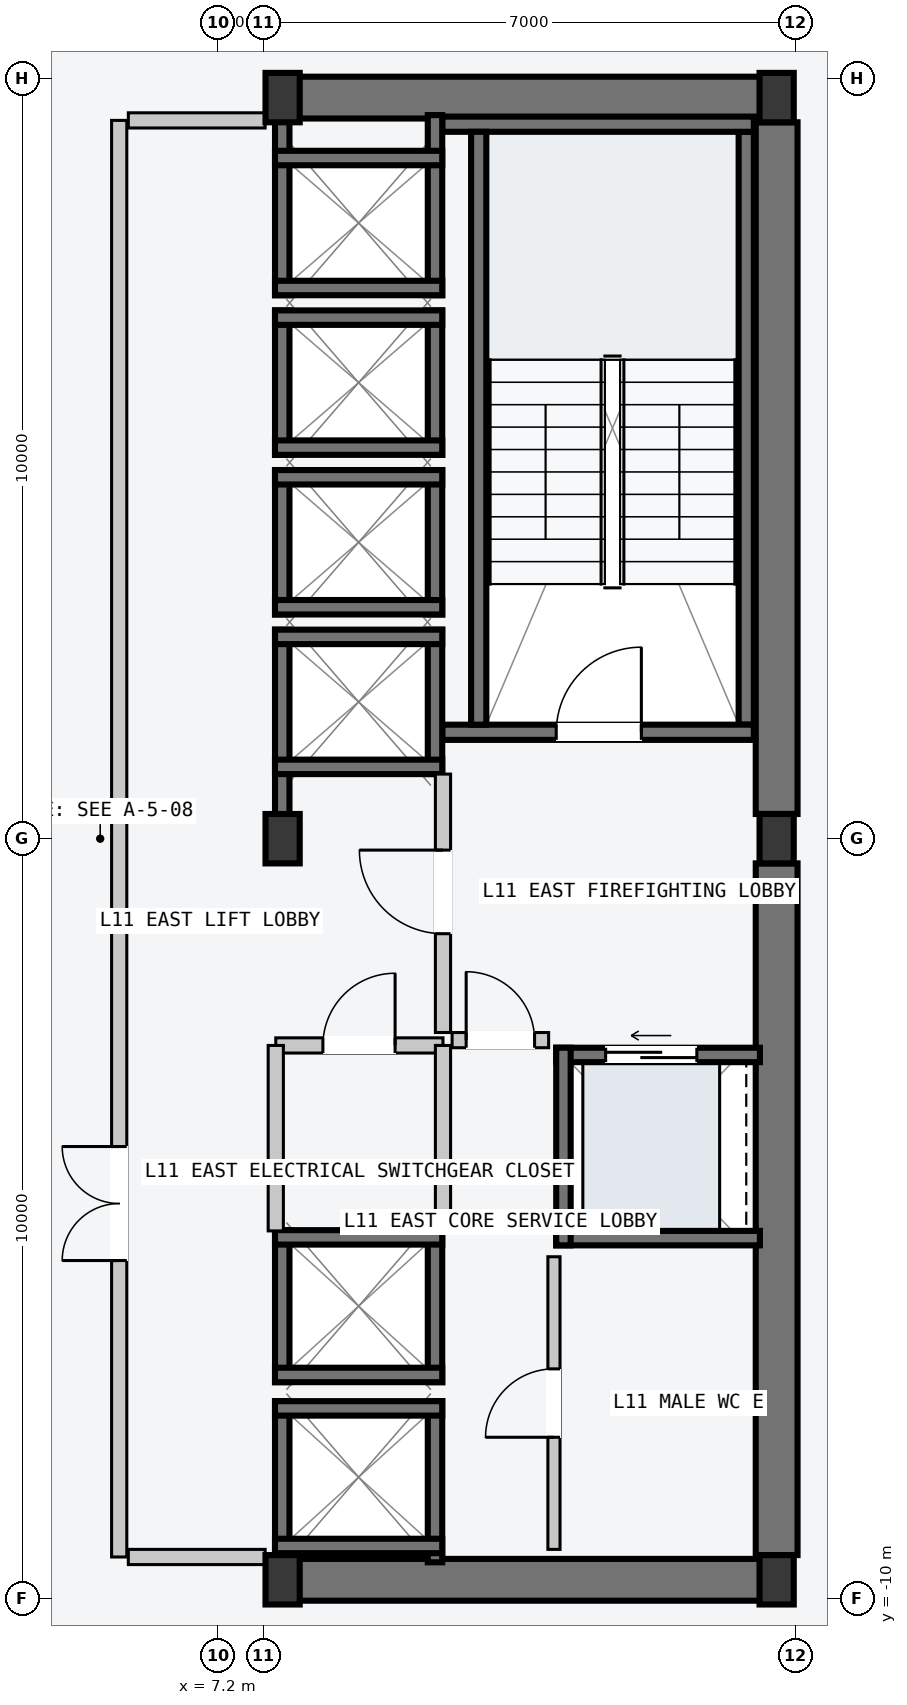
"""IFC4 building model, lengths in metres.
Left out: names, types, materials, properties, quantities, classifications, styles, units other than length and angle.
Written with IfcOpenShell. Run it as: python <this file> out.ifc"""

import sys

from ifc_helpers import new_model, si_unit, direction, frame, frame_2d, origin, origin_2d, place, context, subcontext, project, spatial, rectangle, i_section, extrude, element, fill, save


model = new_model("IFC4")
c1 = context("Model", 3, precision=1e-05, world=origin(), true_north=direction((0.0, 1.0)))
c2 = subcontext(c1, "Body", "Model", "MODEL_VIEW")
j1 = project(units=[si_unit("LENGTHUNIT", "METRE"), si_unit("PLANEANGLEUNIT", "RADIAN")], contexts=[c1])
p1 = place(None, origin())
s1 = spatial("IfcSite", under=j1, at=p1, CompositionType="ELEMENT")
p2 = place(p1, origin())
s2 = spatial("IfcBuilding", under=s1, at=p2, CompositionType="ELEMENT")
p3 = place(p2, frame((0.0, 0.0, 45.6)))
s3 = spatial("IfcBuildingStorey", under=s2, at=p3, CompositionType="ELEMENT", Elevation=45.6)
for number, where, z_axis, x_axis in (
    (1, (8.07, -9.75, -0.2), (0.0, 0.0, 1.0), (1.0, 0.0, 0.0)),
    (2, (8.07, 9.75, -0.2), (0.0, 0.0, 1.0), (1.0, 0.0, 0.0)),
):
    element("IfcWall", number, at=place(p3, frame(where, z_axis=z_axis, x_axis=x_axis)), inside=s3, PredefinedType="SHEAR", context=c2, shape_type="SweptSolid", body=[
        extrude(rectangle(XDim=6.46, YDim=0.55, at=frame_2d((3.23, 0.0))), origin(), (0.0, 0.0, 1.0), 3.6),
    ])
for number, where, z_axis, x_axis in (
    (3, (14.55, -9.425, -0.2), (0.0, 0.0, 1.0), (0.0, 1.0, 0.0)),
    (4, (14.55, 0.325, -0.2), (0.0, 0.0, 1.0), (0.0, 1.0, 0.0)),
):
    element("IfcWall", number, at=place(p3, frame(where, z_axis=z_axis, x_axis=x_axis)), inside=s3, PredefinedType="SHEAR", context=c2, shape_type="SweptSolid", body=[
        extrude(rectangle(XDim=9.1, YDim=0.55, at=frame_2d((4.55, 0.0))), origin(), (0.0, 0.0, 1.0), 3.6),
    ])
p4 = place(p3, frame((14.15, 1.5, -0.2), z_axis=(0.0, 0.0, 1.0), x_axis=(0.0, 1.0, 0.0)))
e5 = element("IfcWall", 5, at=p4, inside=s3, PredefinedType="SOLIDWALL", context=c2, shape_type="SweptSolid", body=[
    extrude(rectangle(XDim=7.8, YDim=0.2, at=frame_2d((3.9, 0.0))), origin(), (0.0, 0.0, 1.0), 3.6),
])
p5 = place(p3, frame((10.15, 1.4, -0.2), z_axis=(0.0, 0.0, 1.0), x_axis=(1.0, 0.0, 0.0)))
e6 = element("IfcWall", 6, at=p5, inside=s3, PredefinedType="SOLIDWALL", context=c2, shape_type="SweptSolid", body=[
    extrude(rectangle(XDim=4.1, YDim=0.2, at=frame_2d((2.05, 0.0))), origin(), (0.0, 0.0, 1.0), 3.6),
])
p6 = place(p5, frame((1.5, 0.0, 0.2)))
e7 = element("IfcOpeningElement", 7, at=p6, cuts=e6, PredefinedType="OPENING", context=c2, shape_type="SweptSolid", body=[
    extrude(rectangle(XDim=1.12, YDim=2.18, at=frame_2d((0.56, 1.09))), frame((0.0, 0.11, 0.0), z_axis=(0.0, -1.0, 0.0), x_axis=(1.0, 0.0, 0.0)), (0.0, 0.0, 1.0), 0.22),
])
p7 = place(p3, frame((10.15, 9.4, -0.2), z_axis=(0.0, 0.0, 1.0), x_axis=(1.0, 0.0, 0.0)))
e8 = element("IfcWall", 8, at=p7, inside=s3, PredefinedType="SOLIDWALL", context=c2, shape_type="SweptSolid", body=[
    extrude(rectangle(XDim=4.1, YDim=0.2, at=frame_2d((2.05, 0.0))), origin(), (0.0, 0.0, 1.0), 3.6),
])
p8 = place(p3, frame((10.63, 1.5, -0.2), z_axis=(0.0, 0.0, 1.0), x_axis=(0.0, 1.0, 0.0)))
e9 = element("IfcWall", 9, at=p8, inside=s3, PredefinedType="SOLIDWALL", context=c2, shape_type="SweptSolid", body=[
    extrude(rectangle(XDim=7.8, YDim=0.2, at=frame_2d((3.9, 0.0))), origin(), (0.0, 0.0, 1.0), 3.6),
])
for number, where, z_axis, x_axis in (
    (10, (8.05, -9.75, 0.0), (0.0, 0.0, 1.0), (1.0, 0.0, 0.0)),
    (11, (8.05, 0.0, 0.0), (0.0, 0.0, 1.0), (1.0, 0.0, 0.0)),
    (12, (8.05, 9.75, 0.0), (0.0, 0.0, 1.0), (1.0, 0.0, 0.0)),
    (13, (14.55, -9.75, 0.0), (0.0, 0.0, 1.0), (1.0, 0.0, 0.0)),
    (14, (14.55, 0.0, 0.0), (0.0, 0.0, 1.0), (1.0, 0.0, 0.0)),
    (15, (14.55, 9.75, 0.0), (0.0, 0.0, 1.0), (1.0, 0.0, 0.0)),
):
    element("IfcColumn", number, at=place(p3, frame(where, z_axis=z_axis, x_axis=x_axis)), inside=s3, PredefinedType="COLUMN", context=c2, shape_type="SweptSolid", body=[
        extrude(i_section(OverallWidth=0.45, OverallDepth=0.65, WebThickness=0.025, FlangeThickness=0.04, at=origin_2d()), origin(), (0.0, 0.0, 1.0), 3.6),
    ])
p9 = place(p3, frame((8.045, 0.21, -0.2), z_axis=(0.0, 0.0, 1.0), x_axis=(0.0, 1.0, 0.0)))
e16 = element("IfcWall", 16, at=p9, inside=s3, PredefinedType="SOLIDWALL", context=c2, shape_type="SweptSolid", body=[
    extrude(rectangle(XDim=2.54, YDim=0.19, at=frame_2d((1.27, 0.0))), origin(), (0.0, 0.0, 1.0), 3.6),
])
p10 = place(p3, frame((10.055, 0.85, -0.2), z_axis=(0.0, 0.0, 1.0), x_axis=(0.0, 1.0, 0.0)))
e17 = element("IfcWall", 17, at=p10, inside=s3, PredefinedType="SOLIDWALL", context=c2, shape_type="SweptSolid", body=[
    extrude(rectangle(XDim=1.9, YDim=0.19, at=frame_2d((0.95, 0.0))), origin(), (0.0, 0.0, 1.0), 3.6),
])
for number, where, z_axis, x_axis in (
    (18, (7.95, 2.655, -0.2), (0.0, 0.0, 1.0), (1.0, 0.0, 0.0)),
    (19, (7.95, 0.945, -0.2), (0.0, 0.0, 1.0), (1.0, 0.0, 0.0)),
):
    element("IfcWall", number, at=place(p3, frame(where, z_axis=z_axis, x_axis=x_axis)), inside=s3, PredefinedType="SOLIDWALL", context=c2, shape_type="SweptSolid", body=[
        extrude(rectangle(XDim=2.2, YDim=0.19, at=frame_2d((1.1, 0.0))), origin(), (0.0, 0.0, 1.0), 3.6),
    ])
for number, where, z_axis, x_axis in (
    (20, (8.045, 2.95, -0.2), (0.0, 0.0, 1.0), (0.0, 1.0, 0.0)),
    (21, (10.055, 2.95, -0.2), (0.0, 0.0, 1.0), (0.0, 1.0, 0.0)),
):
    element("IfcWall", number, at=place(p3, frame(where, z_axis=z_axis, x_axis=x_axis)), inside=s3, PredefinedType="SOLIDWALL", context=c2, shape_type="SweptSolid", body=[
        extrude(rectangle(XDim=1.9, YDim=0.19, at=frame_2d((0.95, 0.0))), origin(), (0.0, 0.0, 1.0), 3.6),
    ])
for number, where, z_axis, x_axis in (
    (22, (7.95, 4.755, -0.2), (0.0, 0.0, 1.0), (1.0, 0.0, 0.0)),
    (23, (7.95, 3.045, -0.2), (0.0, 0.0, 1.0), (1.0, 0.0, 0.0)),
):
    element("IfcWall", number, at=place(p3, frame(where, z_axis=z_axis, x_axis=x_axis)), inside=s3, PredefinedType="SOLIDWALL", context=c2, shape_type="SweptSolid", body=[
        extrude(rectangle(XDim=2.2, YDim=0.19, at=frame_2d((1.1, 0.0))), origin(), (0.0, 0.0, 1.0), 3.6),
    ])
for number, where, z_axis, x_axis in (
    (24, (8.045, 5.05, -0.2), (0.0, 0.0, 1.0), (0.0, 1.0, 0.0)),
    (25, (10.055, 5.05, -0.2), (0.0, 0.0, 1.0), (0.0, 1.0, 0.0)),
):
    element("IfcWall", number, at=place(p3, frame(where, z_axis=z_axis, x_axis=x_axis)), inside=s3, PredefinedType="SOLIDWALL", context=c2, shape_type="SweptSolid", body=[
        extrude(rectangle(XDim=1.9, YDim=0.19, at=frame_2d((0.95, 0.0))), origin(), (0.0, 0.0, 1.0), 3.6),
    ])
for number, where, z_axis, x_axis in (
    (26, (7.95, 6.855, -0.2), (0.0, 0.0, 1.0), (1.0, 0.0, 0.0)),
    (27, (7.95, 5.145, -0.2), (0.0, 0.0, 1.0), (1.0, 0.0, 0.0)),
):
    element("IfcWall", number, at=place(p3, frame(where, z_axis=z_axis, x_axis=x_axis)), inside=s3, PredefinedType="SOLIDWALL", context=c2, shape_type="SweptSolid", body=[
        extrude(rectangle(XDim=2.2, YDim=0.19, at=frame_2d((1.1, 0.0))), origin(), (0.0, 0.0, 1.0), 3.6),
    ])
for number, where, z_axis, x_axis in (
    (28, (8.045, 7.15, -0.2), (0.0, 0.0, 1.0), (0.0, 1.0, 0.0)),
    (29, (10.055, 7.15, -0.2), (0.0, 0.0, 1.0), (0.0, 1.0, 0.0)),
):
    element("IfcWall", number, at=place(p3, frame(where, z_axis=z_axis, x_axis=x_axis)), inside=s3, PredefinedType="SOLIDWALL", context=c2, shape_type="SweptSolid", body=[
        extrude(rectangle(XDim=2.37, YDim=0.19, at=frame_2d((1.185, 0.0))), origin(), (0.0, 0.0, 1.0), 3.6),
    ])
for number, where, z_axis, x_axis in (
    (30, (7.95, 8.955, -0.2), (0.0, 0.0, 1.0), (1.0, 0.0, 0.0)),
    (31, (7.95, 7.245, -0.2), (0.0, 0.0, 1.0), (1.0, 0.0, 0.0)),
):
    element("IfcWall", number, at=place(p3, frame(where, z_axis=z_axis, x_axis=x_axis)), inside=s3, PredefinedType="SOLIDWALL", context=c2, shape_type="SweptSolid", body=[
        extrude(rectangle(XDim=2.2, YDim=0.19, at=frame_2d((1.1, 0.0))), origin(), (0.0, 0.0, 1.0), 3.6),
    ])
for number, where, z_axis, x_axis in (
    (32, (8.045, -9.52, -0.2), (0.0, 0.0, 1.0), (0.0, 1.0, 0.0)),
    (33, (10.055, -9.52, -0.2), (0.0, 0.0, 1.0), (0.0, 1.0, 0.0)),
):
    element("IfcWall", number, at=place(p3, frame(where, z_axis=z_axis, x_axis=x_axis)), inside=s3, PredefinedType="SOLIDWALL", context=c2, shape_type="SweptSolid", body=[
        extrude(rectangle(XDim=2.12, YDim=0.19, at=frame_2d((1.06, 0.0))), origin(), (0.0, 0.0, 1.0), 3.6),
    ])
for number, where, z_axis, x_axis in (
    (34, (7.95, -7.495, -0.2), (0.0, 0.0, 1.0), (1.0, 0.0, 0.0)),
    (35, (7.95, -9.305, -0.2), (0.0, 0.0, 1.0), (1.0, 0.0, 0.0)),
):
    element("IfcWall", number, at=place(p3, frame(where, z_axis=z_axis, x_axis=x_axis)), inside=s3, PredefinedType="SOLIDWALL", context=c2, shape_type="SweptSolid", body=[
        extrude(rectangle(XDim=2.2, YDim=0.19, at=frame_2d((1.1, 0.0))), origin(), (0.0, 0.0, 1.0), 3.6),
    ])
for number, where, z_axis, x_axis in (
    (36, (8.045, -7.15, -0.2), (0.0, 0.0, 1.0), (0.0, 1.0, 0.0)),
    (37, (10.055, -7.15, -0.2), (0.0, 0.0, 1.0), (0.0, 1.0, 0.0)),
):
    element("IfcWall", number, at=place(p3, frame(where, z_axis=z_axis, x_axis=x_axis)), inside=s3, PredefinedType="SOLIDWALL", context=c2, shape_type="SweptSolid", body=[
        extrude(rectangle(XDim=2.0, YDim=0.19, at=frame_2d((1.0, 0.0))), origin(), (0.0, 0.0, 1.0), 3.6),
    ])
for number, where, z_axis, x_axis in (
    (38, (7.95, -5.245, -0.2), (0.0, 0.0, 1.0), (1.0, 0.0, 0.0)),
    (39, (7.95, -7.055, -0.2), (0.0, 0.0, 1.0), (1.0, 0.0, 0.0)),
):
    element("IfcWall", number, at=place(p3, frame(where, z_axis=z_axis, x_axis=x_axis)), inside=s3, PredefinedType="SOLIDWALL", context=c2, shape_type="SweptSolid", body=[
        extrude(rectangle(XDim=2.2, YDim=0.19, at=frame_2d((1.1, 0.0))), origin(), (0.0, 0.0, 1.0), 3.6),
    ])
p11 = place(p3, frame((11.65, -2.845, -0.2), z_axis=(0.0, 0.0, 1.0), x_axis=(1.0, 0.0, 0.0)))
e40 = element("IfcWall", 40, at=p11, inside=s3, PredefinedType="SOLIDWALL", context=c2, shape_type="SweptSolid", body=[
    extrude(rectangle(XDim=2.68, YDim=0.19, at=frame_2d((1.34, 0.0))), origin(), (0.0, 0.0, 1.0), 3.6),
])
p12 = place(p11, frame((0.65, 0.0, 0.2)))
e41 = element("IfcOpeningElement", 41, at=p12, cuts=e40, PredefinedType="OPENING", context=c2, shape_type="SweptSolid", body=[
    extrude(rectangle(XDim=1.2, YDim=2.2, at=frame_2d((0.6, 1.1))), frame((0.0, 0.105, 0.0), z_axis=(0.0, -1.0, 0.0), x_axis=(1.0, 0.0, 0.0)), (0.0, 0.0, 1.0), 0.21),
])
p13 = place(p3, frame((11.65, -5.255, -0.2), z_axis=(0.0, 0.0, 1.0), x_axis=(1.0, 0.0, 0.0)))
e42 = element("IfcWall", 42, at=p13, inside=s3, PredefinedType="SOLIDWALL", context=c2, shape_type="SweptSolid", body=[
    extrude(rectangle(XDim=2.68, YDim=0.19, at=frame_2d((1.34, 0.0))), origin(), (0.0, 0.0, 1.0), 3.6),
])
p14 = place(p3, frame((11.745, -5.35, -0.2), z_axis=(0.0, 0.0, 1.0), x_axis=(0.0, 1.0, 0.0)))
e43 = element("IfcWall", 43, at=p14, inside=s3, PredefinedType="SOLIDWALL", context=c2, shape_type="SweptSolid", body=[
    extrude(rectangle(XDim=2.6, YDim=0.19, at=frame_2d((1.3, 0.0))), origin(), (0.0, 0.0, 1.0), 3.6),
])
p15 = place(p3, frame((5.9, -9.45, 0.0), z_axis=(0.0, 0.0, 1.0), x_axis=(0.0, 1.0, 0.0)))
e44 = element("IfcWall", 44, at=p15, inside=s3, PredefinedType="PARTITIONING", context=c2, shape_type="SweptSolid", body=[
    extrude(rectangle(XDim=18.9, YDim=0.2, at=frame_2d((9.45, 0.0))), origin(), (0.0, 0.0, 1.0), 3.4),
])
p16 = place(p15, frame((3.9, 0.0, 0.0)))
e45 = element("IfcOpeningElement", 45, at=p16, cuts=e44, PredefinedType="OPENING", context=c2, shape_type="SweptSolid", body=[
    extrude(rectangle(XDim=1.5, YDim=2.2, at=frame_2d((0.75, 1.1))), frame((0.0, 0.11, 0.0), z_axis=(0.0, -1.0, 0.0), x_axis=(1.0, 0.0, 0.0)), (0.0, 0.0, 1.0), 0.22),
])
for number, where, z_axis, x_axis in (
    (46, (6.02, -9.45, 0.0), (0.0, 0.0, 1.0), (1.0, 0.0, 0.0)),
    (47, (6.02, 9.45, 0.0), (0.0, 0.0, 1.0), (1.0, 0.0, 0.0)),
):
    element("IfcWall", number, at=place(p3, frame(where, z_axis=z_axis, x_axis=x_axis)), inside=s3, PredefinedType="PARTITIONING", context=c2, shape_type="SweptSolid", body=[
        extrude(rectangle(XDim=1.8, YDim=0.2, at=frame_2d((0.9, 0.0))), origin(), (0.0, 0.0, 1.0), 3.4),
    ])
p17 = place(p3, frame((10.16, -2.55, 0.0), z_axis=(0.0, 0.0, 1.0), x_axis=(0.0, 1.0, 0.0)))
e48 = element("IfcWall", 48, at=p17, inside=s3, PredefinedType="PARTITIONING", context=c2, shape_type="SweptSolid", body=[
    extrude(rectangle(XDim=3.4, YDim=0.2, at=frame_2d((1.7, 0.0))), origin(), (0.0, 0.0, 1.0), 3.4),
])
p18 = place(p17, frame((1.3, 0.0, 0.0)))
e49 = element("IfcOpeningElement", 49, at=p18, cuts=e48, PredefinedType="OPENING", context=c2, shape_type="SweptSolid", body=[
    extrude(rectangle(XDim=1.1, YDim=2.15, at=frame_2d((0.55, 1.075))), frame((0.0, 0.11, 0.0), z_axis=(0.0, -1.0, 0.0), x_axis=(1.0, 0.0, 0.0)), (0.0, 0.0, 1.0), 0.22),
])
p19 = place(p3, frame((10.28, -2.65, 0.0), z_axis=(0.0, 0.0, 1.0), x_axis=(1.0, 0.0, 0.0)))
e50 = element("IfcWall", 50, at=p19, inside=s3, PredefinedType="PARTITIONING", context=c2, shape_type="SweptSolid", body=[
    extrude(rectangle(XDim=1.27, YDim=0.2, at=frame_2d((0.635, 0.0))), origin(), (0.0, 0.0, 1.0), 3.4),
])
p20 = place(p19, frame((0.185, 0.0, 0.0)))
e51 = element("IfcOpeningElement", 51, at=p20, cuts=e50, PredefinedType="OPENING", context=c2, shape_type="SweptSolid", body=[
    extrude(rectangle(XDim=0.9, YDim=2.15, at=frame_2d((0.45, 1.075))), frame((0.0, 0.11, 0.0), z_axis=(0.0, -1.0, 0.0), x_axis=(1.0, 0.0, 0.0)), (0.0, 0.0, 1.0), 0.22),
])
p21 = place(p3, frame((7.96, -2.72, 0.0), z_axis=(0.0, 0.0, 1.0), x_axis=(1.0, 0.0, 0.0)))
e52 = element("IfcWall", 52, at=p21, inside=s3, PredefinedType="PARTITIONING", context=c2, shape_type="SweptSolid", body=[
    extrude(rectangle(XDim=2.2, YDim=0.2, at=frame_2d((1.1, 0.0))), origin(), (0.0, 0.0, 1.0), 3.4),
])
p22 = place(p21, frame((0.62, 0.0, 0.0)))
e53 = element("IfcOpeningElement", 53, at=p22, cuts=e52, PredefinedType="OPENING", context=c2, shape_type="SweptSolid", body=[
    extrude(rectangle(XDim=0.95, YDim=2.1, at=frame_2d((0.475, 1.05))), frame((0.0, 0.11, 0.0), z_axis=(0.0, -1.0, 0.0), x_axis=(1.0, 0.0, 0.0)), (0.0, 0.0, 1.0), 0.22),
])
for number, where, z_axis, x_axis in (
    (54, (7.96, -5.16, 0.0), (0.0, 0.0, 1.0), (0.0, 1.0, 0.0)),
    (55, (10.16, -5.16, 0.0), (0.0, 0.0, 1.0), (0.0, 1.0, 0.0)),
):
    element("IfcWall", number, at=place(p3, frame(where, z_axis=z_axis, x_axis=x_axis)), inside=s3, PredefinedType="PARTITIONING", context=c2, shape_type="SweptSolid", body=[
        extrude(rectangle(XDim=2.44, YDim=0.2, at=frame_2d((1.22, 0.0))), origin(), (0.0, 0.0, 1.0), 3.4),
    ])
p23 = place(p3, frame((11.62, -9.35, 0.0), z_axis=(0.0, 0.0, 1.0), x_axis=(0.0, 1.0, 0.0)))
e56 = element("IfcWall", 56, at=p23, inside=s3, PredefinedType="PARTITIONING", context=c2, shape_type="SweptSolid", body=[
    extrude(rectangle(XDim=3.85, YDim=0.16, at=frame_2d((1.925, 0.0))), origin(), (0.0, 0.0, 1.0), 3.4),
])
p24 = place(p23, frame((1.475, 0.0, 0.0)))
e57 = element("IfcOpeningElement", 57, at=p24, cuts=e56, PredefinedType="OPENING", context=c2, shape_type="SweptSolid", body=[
    extrude(rectangle(XDim=0.9, YDim=2.15, at=frame_2d((0.45, 1.075))), frame((0.0, 0.09, 0.0), z_axis=(0.0, -1.0, 0.0), x_axis=(1.0, 0.0, 0.0)), (0.0, 0.0, 1.0), 0.18),
])
p25 = place(p6, origin())
e58 = element("IfcDoor", 58, at=p25, inside=s3, OperationType="SINGLE_SWING_RIGHT", PredefinedType="DOOR", context=c2, shape_type="SweptSolid", body=[
    extrude(rectangle(XDim=1.12, YDim=2.18, at=frame_2d((0.56, 1.09))), frame((0.0, 0.025, 0.0), z_axis=(0.0, -1.0, 0.0), x_axis=(1.0, 0.0, 0.0)), (0.0, 0.0, 1.0), 0.05),
])
fill(e7, e58)
p26 = place(p12, origin())
e59 = element("IfcDoor", 59, at=p26, inside=s3, OperationType="SLIDING_TO_LEFT", PredefinedType="DOOR", context=c2, shape_type="SweptSolid", body=[
    extrude(rectangle(XDim=1.2, YDim=2.2, at=frame_2d((0.6, 1.1))), frame((0.0, 0.025, 0.0), z_axis=(0.0, -1.0, 0.0), x_axis=(1.0, 0.0, 0.0)), (0.0, 0.0, 1.0), 0.05),
])
fill(e41, e59)
p27 = place(p16, origin())
e60 = element("IfcDoor", 60, at=p27, inside=s3, OperationType="DOUBLE_DOOR_SINGLE_SWING", PredefinedType="DOOR", context=c2, shape_type="SweptSolid", body=[
    extrude(rectangle(XDim=1.5, YDim=2.2, at=frame_2d((0.75, 1.1))), frame((0.0, 0.025, 0.0), z_axis=(0.0, -1.0, 0.0), x_axis=(1.0, 0.0, 0.0)), (0.0, 0.0, 1.0), 0.05),
])
fill(e45, e60)
p28 = place(p18, origin())
e61 = element("IfcDoor", 61, at=p28, inside=s3, OperationType="SINGLE_SWING_RIGHT", PredefinedType="DOOR", context=c2, shape_type="SweptSolid", body=[
    extrude(rectangle(XDim=1.1, YDim=2.15, at=frame_2d((0.55, 1.075))), frame((0.0, 0.025, 0.0), z_axis=(0.0, -1.0, 0.0), x_axis=(1.0, 0.0, 0.0)), (0.0, 0.0, 1.0), 0.05),
])
fill(e49, e61)
p29 = place(p20, origin())
e62 = element("IfcDoor", 62, at=p29, inside=s3, OperationType="SINGLE_SWING_LEFT", PredefinedType="DOOR", context=c2, shape_type="SweptSolid", body=[
    extrude(rectangle(XDim=0.9, YDim=2.15, at=frame_2d((0.45, 1.075))), frame((0.0, 0.025, 0.0), z_axis=(0.0, -1.0, 0.0), x_axis=(1.0, 0.0, 0.0)), (0.0, 0.0, 1.0), 0.05),
])
fill(e51, e62)
p30 = place(p22, origin())
e63 = element("IfcDoor", 63, at=p30, inside=s3, OperationType="SINGLE_SWING_RIGHT", PredefinedType="DOOR", context=c2, shape_type="SweptSolid", body=[
    extrude(rectangle(XDim=0.95, YDim=2.1, at=frame_2d((0.475, 1.05))), frame((0.0, 0.025, 0.0), z_axis=(0.0, -1.0, 0.0), x_axis=(1.0, 0.0, 0.0)), (0.0, 0.0, 1.0), 0.05),
])
fill(e53, e63)
p31 = place(p24, origin())
e64 = element("IfcDoor", 64, at=p31, inside=s3, OperationType="SINGLE_SWING_LEFT", PredefinedType="DOOR", context=c2, shape_type="SweptSolid", body=[
    extrude(rectangle(XDim=0.9, YDim=2.15, at=frame_2d((0.45, 1.075))), frame((0.0, 0.025, 0.0), z_axis=(0.0, -1.0, 0.0), x_axis=(1.0, 0.0, 0.0)), (0.0, 0.0, 1.0), 0.05),
])
fill(e57, e64)
save(model, sys.argv[1])
